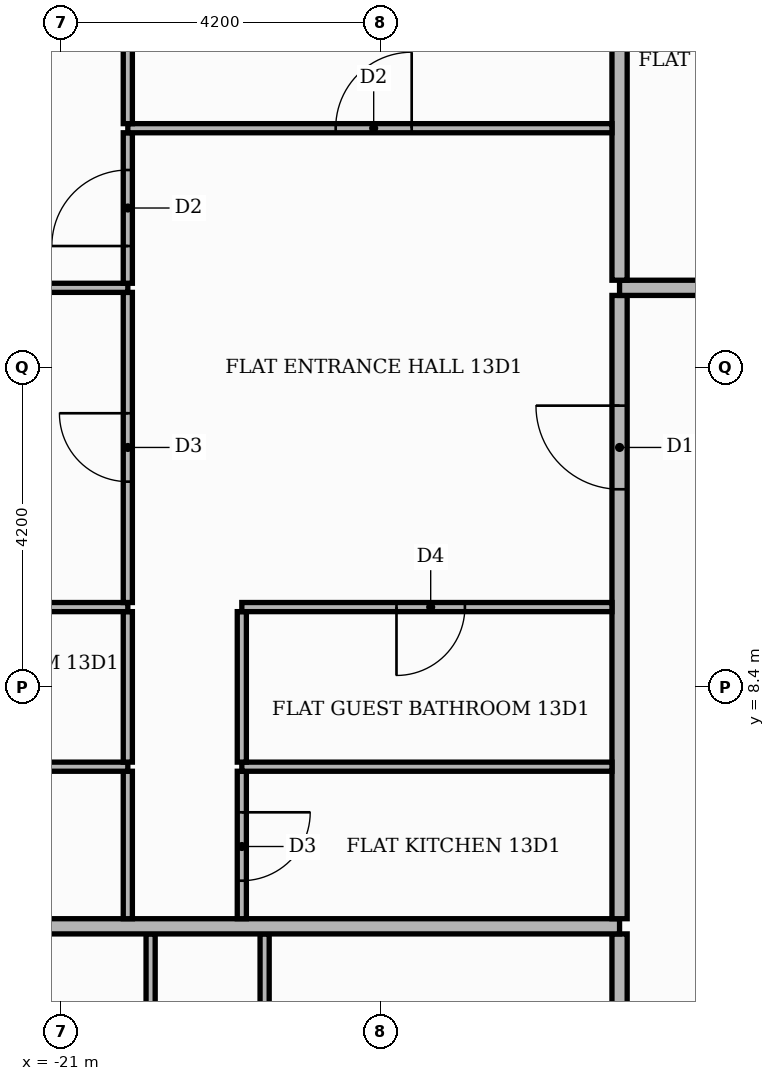
"""IFC4 building model, lengths in metres.
Left out: names, types, materials, properties, quantities, classifications, styles, units other than length and angle.
Written with IfcOpenShell. Run it as: python <this file> out.ifc"""

import sys

from ifc_helpers import new_model, si_unit, direction, frame, frame_2d, origin, place, context, subcontext, project, spatial, rectangle, extrude, element, fill, save


model = new_model("IFC4")
c1 = context("Model", 3, precision=1e-05, world=origin(), true_north=direction((0.0, 1.0)))
c2 = subcontext(c1, "Body", "Model", "MODEL_VIEW")
j1 = project(units=[si_unit("LENGTHUNIT", "METRE"), si_unit("PLANEANGLEUNIT", "RADIAN")], contexts=[c1])
p1 = place(None, origin())
s1 = spatial("IfcSite", under=j1, at=p1, CompositionType="ELEMENT")
p2 = place(p1, origin())
s2 = spatial("IfcBuilding", under=s1, at=p2, CompositionType="ELEMENT")
p3 = place(p2, frame((0.0, 0.0, 58.2)))
s3 = spatial("IfcBuildingStorey", under=s2, at=p3, CompositionType="ELEMENT", Elevation=58.2)
p4 = place(p3, frame((-13.65, -13.55, 0.0), z_axis=(0.0, 0.0, 1.0), x_axis=(0.0, 1.0, 0.0)))
e1 = element("IfcWall", 1, at=p4, inside=s3, PredefinedType="PARTITIONING", context=c2, shape_type="SweptSolid", body=[
    extrude(rectangle(XDim=18.7, YDim=0.2, at=frame_2d((9.35, 0.0))), origin(), (0.0, 0.0, 1.0), 3.48),
])
p5 = place(p4, frame((11.95, 0.0, 0.0)))
e2 = element("IfcOpeningElement", 2, at=p5, cuts=e1, PredefinedType="OPENING", context=c2, shape_type="SweptSolid", body=[
    extrude(rectangle(XDim=1.1, YDim=2.4, at=frame_2d((0.55, 1.2))), frame((0.0, 0.11, 0.0), z_axis=(0.0, -1.0, 0.0), x_axis=(1.0, 0.0, 0.0)), (0.0, 0.0, 1.0), 0.22),
])
p6 = place(p3, frame((-19.82, 1.11, 0.0), z_axis=(0.0, 0.0, 1.0), x_axis=(0.0, 1.0, 0.0)))
e3 = element("IfcWall", 3, at=p6, inside=s3, PredefinedType="PARTITIONING", context=c2, shape_type="SweptSolid", body=[
    extrude(rectangle(XDim=4.04, YDim=0.12, at=frame_2d((2.02, 0.0))), origin(), (0.0, 0.0, 1.0), 3.48),
])
p7 = place(p6, frame((1.54, 0.0, 0.0)))
e4 = element("IfcOpeningElement", 4, at=p7, cuts=e3, PredefinedType="OPENING", context=c2, shape_type="SweptSolid", body=[
    extrude(rectangle(XDim=1.0, YDim=2.1, at=frame_2d((0.5, 1.05))), frame((0.0, 0.07, 0.0), z_axis=(0.0, -1.0, 0.0), x_axis=(1.0, 0.0, 0.0)), (0.0, 0.0, 1.0), 0.14),
])
p8 = place(p3, frame((-18.32, 1.11, 0.0), z_axis=(0.0, 0.0, 1.0), x_axis=(0.0, 1.0, 0.0)))
e5 = element("IfcWall", 5, at=p8, inside=s3, PredefinedType="PARTITIONING", context=c2, shape_type="SweptSolid", body=[
    extrude(rectangle(XDim=4.04, YDim=0.12, at=frame_2d((2.02, 0.0))), origin(), (0.0, 0.0, 1.0), 3.48),
])
p9 = place(p3, frame((-25.42, 5.25, 0.0), z_axis=(0.0, 0.0, 1.0), x_axis=(1.0, 0.0, 0.0)))
e6 = element("IfcWall", 6, at=p9, inside=s3, PredefinedType="PARTITIONING", context=c2, shape_type="SweptSolid", body=[
    extrude(rectangle(XDim=11.77, YDim=0.2, at=frame_2d((5.885, 0.0))), origin(), (0.0, 0.0, 1.0), 3.48),
])
p10 = place(p3, frame((-20.12, 5.35, 0.0), z_axis=(0.0, 0.0, 1.0), x_axis=(0.0, 1.0, 0.0)))
e7 = element("IfcWall", 7, at=p10, inside=s3, PredefinedType="PARTITIONING", context=c2, shape_type="SweptSolid", body=[
    extrude(rectangle(XDim=1.94, YDim=0.12, at=frame_2d((0.97, 0.0))), origin(), (0.0, 0.0, 1.0), 3.48),
])
p11 = place(p3, frame((-18.62, 5.35, 0.0), z_axis=(0.0, 0.0, 1.0), x_axis=(0.0, 1.0, 0.0)))
e8 = element("IfcWall", 8, at=p11, inside=s3, PredefinedType="PARTITIONING", context=c2, shape_type="SweptSolid", body=[
    extrude(rectangle(XDim=1.94, YDim=0.12, at=frame_2d((0.97, 0.0))), origin(), (0.0, 0.0, 1.0), 3.48),
])
p12 = place(p11, frame((0.5, 0.0, 0.0)))
e9 = element("IfcOpeningElement", 9, at=p12, cuts=e8, PredefinedType="OPENING", context=c2, shape_type="SweptSolid", body=[
    extrude(rectangle(XDim=0.9, YDim=2.1, at=frame_2d((0.45, 1.05))), frame((0.0, 0.07, 0.0), z_axis=(0.0, -1.0, 0.0), x_axis=(1.0, 0.0, 0.0)), (0.0, 0.0, 1.0), 0.14),
])
p13 = place(p3, frame((-13.65, 5.35, 0.0), z_axis=(0.0, 0.0, 1.0), x_axis=(0.0, 1.0, 0.0)))
e10 = element("IfcWall", 10, at=p13, inside=s3, PredefinedType="PARTITIONING", context=c2, shape_type="SweptSolid", body=[
    extrude(rectangle(XDim=8.2, YDim=0.2, at=frame_2d((4.1, 0.0))), origin(), (0.0, 0.0, 1.0), 3.48),
])
p14 = place(p13, frame((5.65, 0.0, 0.0)))
e11 = element("IfcOpeningElement", 11, at=p14, cuts=e10, PredefinedType="OPENING", context=c2, shape_type="SweptSolid", body=[
    extrude(rectangle(XDim=1.1, YDim=2.4, at=frame_2d((0.55, 1.2))), frame((0.0, 0.11, 0.0), z_axis=(0.0, -1.0, 0.0), x_axis=(1.0, 0.0, 0.0)), (0.0, 0.0, 1.0), 0.22),
])
p15 = place(p3, frame((-25.42, 7.35, 0.0), z_axis=(0.0, 0.0, 1.0), x_axis=(1.0, 0.0, 0.0)))
e12 = element("IfcWall", 12, at=p15, inside=s3, PredefinedType="PARTITIONING", context=c2, shape_type="SweptSolid", body=[
    extrude(rectangle(XDim=5.3, YDim=0.12, at=frame_2d((2.65, 0.0))), origin(), (0.0, 0.0, 1.0), 3.48),
])
p16 = place(p15, frame((2.05, 0.0, 0.0)))
e13 = element("IfcOpeningElement", 13, at=p16, cuts=e12, PredefinedType="OPENING", context=c2, shape_type="SweptSolid", body=[
    extrude(rectangle(XDim=0.9, YDim=2.1, at=frame_2d((0.45, 1.05))), frame((0.0, 0.07, 0.0), z_axis=(0.0, -1.0, 0.0), x_axis=(1.0, 0.0, 0.0)), (0.0, 0.0, 1.0), 0.14),
])
p17 = place(p3, frame((-18.62, 7.35, 0.0), z_axis=(0.0, 0.0, 1.0), x_axis=(1.0, 0.0, 0.0)))
e14 = element("IfcWall", 14, at=p17, inside=s3, PredefinedType="PARTITIONING", context=c2, shape_type="SweptSolid", body=[
    extrude(rectangle(XDim=4.87, YDim=0.12, at=frame_2d((2.435, 0.0))), origin(), (0.0, 0.0, 1.0), 3.48),
])
for number, where, z_axis, x_axis in (
    (15, (-20.12, 7.41, 0.0), (0.0, 0.0, 1.0), (0.0, 1.0, 0.0)),
    (16, (-18.62, 7.41, 0.0), (0.0, 0.0, 1.0), (0.0, 1.0, 0.0)),
):
    element("IfcWall", number, at=place(p3, frame(where, z_axis=z_axis, x_axis=x_axis)), inside=s3, PredefinedType="PARTITIONING", context=c2, shape_type="SweptSolid", body=[
        extrude(rectangle(XDim=1.98, YDim=0.12, at=frame_2d((0.99, 0.0))), origin(), (0.0, 0.0, 1.0), 3.48),
    ])
p18 = place(p3, frame((-25.42, 9.45, 0.0), z_axis=(0.0, 0.0, 1.0), x_axis=(1.0, 0.0, 0.0)))
e17 = element("IfcWall", 17, at=p18, inside=s3, PredefinedType="PARTITIONING", context=c2, shape_type="SweptSolid", body=[
    extrude(rectangle(XDim=5.3, YDim=0.12, at=frame_2d((2.65, 0.0))), origin(), (0.0, 0.0, 1.0), 3.48),
])
p19 = place(p18, frame((2.05, 0.0, 0.0)))
e18 = element("IfcOpeningElement", 18, at=p19, cuts=e17, PredefinedType="OPENING", context=c2, shape_type="SweptSolid", body=[
    extrude(rectangle(XDim=0.9, YDim=2.1, at=frame_2d((0.45, 1.05))), frame((0.0, 0.07, 0.0), z_axis=(0.0, -1.0, 0.0), x_axis=(1.0, 0.0, 0.0)), (0.0, 0.0, 1.0), 0.14),
])
p20 = place(p3, frame((-18.62, 9.45, 0.0), z_axis=(0.0, 0.0, 1.0), x_axis=(1.0, 0.0, 0.0)))
e19 = element("IfcWall", 19, at=p20, inside=s3, PredefinedType="PARTITIONING", context=c2, shape_type="SweptSolid", body=[
    extrude(rectangle(XDim=4.87, YDim=0.12, at=frame_2d((2.435, 0.0))), origin(), (0.0, 0.0, 1.0), 3.48),
])
p21 = place(p20, frame((2.035, 0.0, 0.0)))
e20 = element("IfcOpeningElement", 20, at=p21, cuts=e19, PredefinedType="OPENING", context=c2, shape_type="SweptSolid", body=[
    extrude(rectangle(XDim=0.9, YDim=2.1, at=frame_2d((0.45, 1.05))), frame((0.0, 0.07, 0.0), z_axis=(0.0, -1.0, 0.0), x_axis=(1.0, 0.0, 0.0)), (0.0, 0.0, 1.0), 0.14),
])
p22 = place(p3, frame((-20.12, 9.51, 0.0), z_axis=(0.0, 0.0, 1.0), x_axis=(0.0, 1.0, 0.0)))
e21 = element("IfcWall", 21, at=p22, inside=s3, PredefinedType="PARTITIONING", context=c2, shape_type="SweptSolid", body=[
    extrude(rectangle(XDim=4.08, YDim=0.12, at=frame_2d((2.04, 0.0))), origin(), (0.0, 0.0, 1.0), 3.48),
])
p23 = place(p22, frame((1.59, 0.0, 0.0)))
e22 = element("IfcOpeningElement", 22, at=p23, cuts=e21, PredefinedType="OPENING", context=c2, shape_type="SweptSolid", body=[
    extrude(rectangle(XDim=0.9, YDim=2.1, at=frame_2d((0.45, 1.05))), frame((0.0, 0.07, 0.0), z_axis=(0.0, -1.0, 0.0), x_axis=(1.0, 0.0, 0.0)), (0.0, 0.0, 1.0), 0.14),
])
p24 = place(p3, frame((-25.42, 13.65, 0.0), z_axis=(0.0, 0.0, 1.0), x_axis=(1.0, 0.0, 0.0)))
e23 = element("IfcWall", 23, at=p24, inside=s3, PredefinedType="PARTITIONING", context=c2, shape_type="SweptSolid", body=[
    extrude(rectangle(XDim=5.3, YDim=0.12, at=frame_2d((2.65, 0.0))), origin(), (0.0, 0.0, 1.0), 3.48),
])
p25 = place(p3, frame((-13.65, 13.65, 0.0), z_axis=(0.0, 0.0, 1.0), x_axis=(1.0, 0.0, 0.0)))
e24 = element("IfcWall", 24, at=p25, inside=s3, PredefinedType="PARTITIONING", context=c2, shape_type="SweptSolid", body=[
    extrude(rectangle(XDim=39.07, YDim=0.2, at=frame_2d((19.535, 0.0))), origin(), (0.0, 0.0, 1.0), 3.48),
])
p26 = place(p25, frame((24.65, 0.0, 0.0)))
e25 = element("IfcOpeningElement", 25, at=p26, cuts=e24, PredefinedType="OPENING", context=c2, shape_type="SweptSolid", body=[
    extrude(rectangle(XDim=1.1, YDim=2.4, at=frame_2d((0.55, 1.2))), frame((0.0, 0.11, 0.0), z_axis=(0.0, -1.0, 0.0), x_axis=(1.0, 0.0, 0.0)), (0.0, 0.0, 1.0), 0.22),
])
p27 = place(p25, frame((14.15, 0.0, 0.0)))
e26 = element("IfcOpeningElement", 26, at=p27, cuts=e24, PredefinedType="OPENING", context=c2, shape_type="SweptSolid", body=[
    extrude(rectangle(XDim=1.1, YDim=2.4, at=frame_2d((0.55, 1.2))), frame((0.0, 0.11, 0.0), z_axis=(0.0, -1.0, 0.0), x_axis=(1.0, 0.0, 0.0)), (0.0, 0.0, 1.0), 0.22),
])
p28 = place(p3, frame((-20.12, 13.71, 0.0), z_axis=(0.0, 0.0, 1.0), x_axis=(0.0, 1.0, 0.0)))
e27 = element("IfcWall", 27, at=p28, inside=s3, PredefinedType="PARTITIONING", context=c2, shape_type="SweptSolid", body=[
    extrude(rectangle(XDim=1.98, YDim=0.12, at=frame_2d((0.99, 0.0))), origin(), (0.0, 0.0, 1.0), 3.48),
])
p29 = place(p28, frame((0.49, 0.0, 0.0)))
e28 = element("IfcOpeningElement", 28, at=p29, cuts=e27, PredefinedType="OPENING", context=c2, shape_type="SweptSolid", body=[
    extrude(rectangle(XDim=1.0, YDim=2.1, at=frame_2d((0.5, 1.05))), frame((0.0, 0.07, 0.0), z_axis=(0.0, -1.0, 0.0), x_axis=(1.0, 0.0, 0.0)), (0.0, 0.0, 1.0), 0.14),
])
p30 = place(p3, frame((-13.65, 13.75, 0.0), z_axis=(0.0, 0.0, 1.0), x_axis=(0.0, 1.0, 0.0)))
e29 = element("IfcWall", 29, at=p30, inside=s3, PredefinedType="PARTITIONING", context=c2, shape_type="SweptSolid", body=[
    extrude(rectangle(XDim=11.67, YDim=0.2, at=frame_2d((5.835, 0.0))), origin(), (0.0, 0.0, 1.0), 3.48),
])
p31 = place(p3, frame((-20.12, 15.75, 0.0), z_axis=(0.0, 0.0, 1.0), x_axis=(1.0, 0.0, 0.0)))
e30 = element("IfcWall", 30, at=p31, inside=s3, PredefinedType="PARTITIONING", context=c2, shape_type="SweptSolid", body=[
    extrude(rectangle(XDim=6.37, YDim=0.12, at=frame_2d((3.185, 0.0))), origin(), (0.0, 0.0, 1.0), 3.48),
])
p32 = place(p31, frame((2.735, 0.0, 0.0)))
e31 = element("IfcOpeningElement", 31, at=p32, cuts=e30, PredefinedType="OPENING", context=c2, shape_type="SweptSolid", body=[
    extrude(rectangle(XDim=1.0, YDim=2.1, at=frame_2d((0.5, 1.05))), frame((0.0, 0.07, 0.0), z_axis=(0.0, -1.0, 0.0), x_axis=(1.0, 0.0, 0.0)), (0.0, 0.0, 1.0), 0.14),
])
p33 = place(p3, frame((-20.12, 15.81, 0.0), z_axis=(0.0, 0.0, 1.0), x_axis=(0.0, 1.0, 0.0)))
e32 = element("IfcWall", 32, at=p33, inside=s3, PredefinedType="PARTITIONING", context=c2, shape_type="SweptSolid", body=[
    extrude(rectangle(XDim=1.49, YDim=0.12, at=frame_2d((0.745, 0.0))), origin(), (0.0, 0.0, 1.0), 3.48),
])
p34 = place(p14, origin())
e33 = element("IfcDoor", 33, at=p34, inside=s3, OperationType="SINGLE_SWING_RIGHT", PredefinedType="DOOR", context=c2, shape_type="SweptSolid", body=[
    extrude(rectangle(XDim=1.1, YDim=2.4, at=frame_2d((0.55, 1.2))), frame((0.0, 0.025, 0.0), z_axis=(0.0, -1.0, 0.0), x_axis=(1.0, 0.0, 0.0)), (0.0, 0.0, 1.0), 0.05),
])
fill(e11, e33)
p35 = place(p32, origin())
e34 = element("IfcDoor", 34, at=p35, inside=s3, OperationType="SINGLE_SWING_RIGHT", PredefinedType="DOOR", context=c2, shape_type="SweptSolid", body=[
    extrude(rectangle(XDim=1.0, YDim=2.1, at=frame_2d((0.5, 1.05))), frame((0.0, 0.025, 0.0), z_axis=(0.0, -1.0, 0.0), x_axis=(1.0, 0.0, 0.0)), (0.0, 0.0, 1.0), 0.05),
])
fill(e31, e34)
p36 = place(p21, frame((0.9, 0.0, 0.0), z_axis=(0.0, 0.0, 1.0), x_axis=(-1.0, 0.0, 0.0)))
e35 = element("IfcDoor", 35, at=p36, inside=s3, OperationType="SINGLE_SWING_LEFT", PredefinedType="DOOR", context=c2, shape_type="SweptSolid", body=[
    extrude(rectangle(XDim=0.9, YDim=2.1, at=frame_2d((0.45, 1.05))), frame((0.0, 0.025, 0.0), z_axis=(0.0, -1.0, 0.0), x_axis=(1.0, 0.0, 0.0)), (0.0, 0.0, 1.0), 0.05),
])
fill(e20, e35)
p37 = place(p12, frame((0.9, 0.0, 0.0), z_axis=(0.0, 0.0, 1.0), x_axis=(-1.0, 0.0, 0.0)))
e36 = element("IfcDoor", 36, at=p37, inside=s3, OperationType="SINGLE_SWING_RIGHT", PredefinedType="DOOR", context=c2, shape_type="SweptSolid", body=[
    extrude(rectangle(XDim=0.9, YDim=2.1, at=frame_2d((0.45, 1.05))), frame((0.0, 0.025, 0.0), z_axis=(0.0, -1.0, 0.0), x_axis=(1.0, 0.0, 0.0)), (0.0, 0.0, 1.0), 0.05),
])
fill(e9, e36)
p38 = place(p29, origin())
e37 = element("IfcDoor", 37, at=p38, inside=s3, OperationType="SINGLE_SWING_LEFT", PredefinedType="DOOR", context=c2, shape_type="SweptSolid", body=[
    extrude(rectangle(XDim=1.0, YDim=2.1, at=frame_2d((0.5, 1.05))), frame((0.0, 0.025, 0.0), z_axis=(0.0, -1.0, 0.0), x_axis=(1.0, 0.0, 0.0)), (0.0, 0.0, 1.0), 0.05),
])
fill(e28, e37)
p39 = place(p23, origin())
e38 = element("IfcDoor", 38, at=p39, inside=s3, OperationType="SINGLE_SWING_RIGHT", PredefinedType="DOOR", context=c2, shape_type="SweptSolid", body=[
    extrude(rectangle(XDim=0.9, YDim=2.1, at=frame_2d((0.45, 1.05))), frame((0.0, 0.025, 0.0), z_axis=(0.0, -1.0, 0.0), x_axis=(1.0, 0.0, 0.0)), (0.0, 0.0, 1.0), 0.05),
])
fill(e22, e38)
save(model, sys.argv[1])
